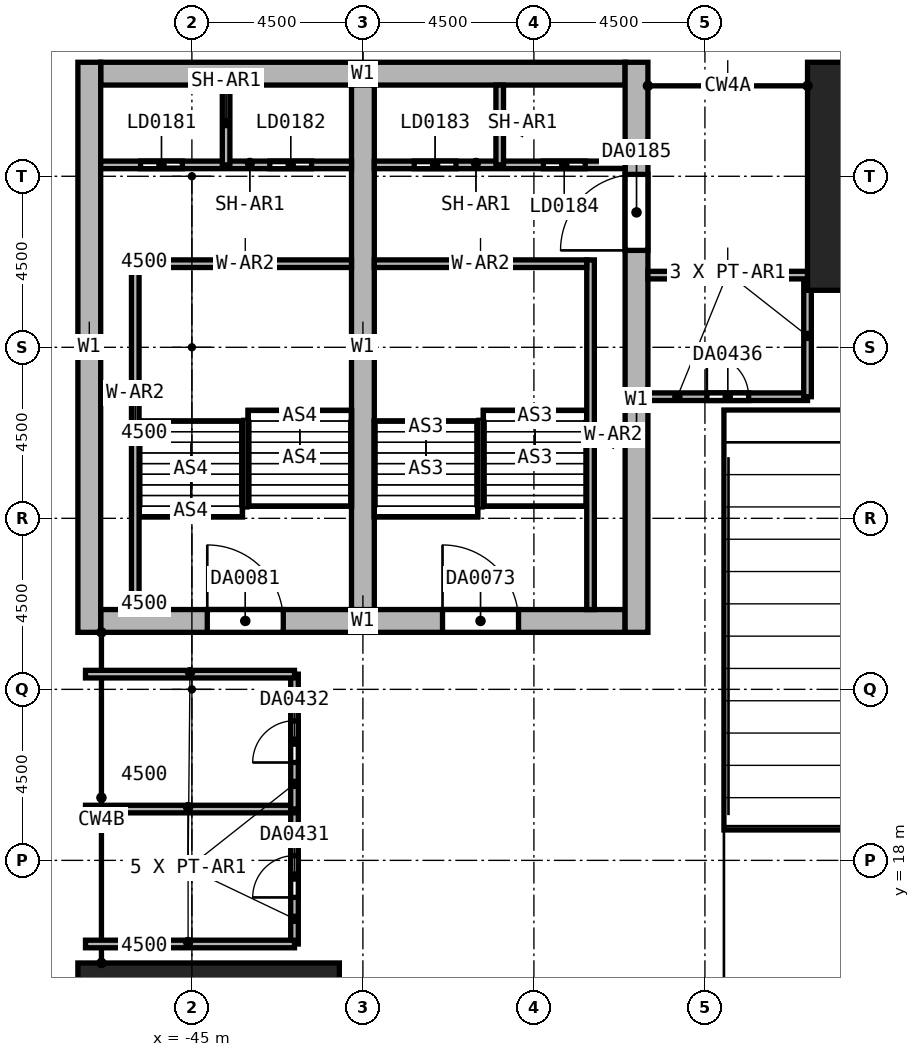
"""IFC4 building model, lengths in metres.
Left out: names, types, materials, properties, quantities, classifications, styles, units other than length and angle.
Written with IfcOpenShell. Run it as: python <this file> out.ifc"""

import sys

from ifc_helpers import new_model, si_unit, direction, frame, frame_2d, origin, origin_2d, place, context, subcontext, project, spatial, rectangle, extrude, element, fill, save


model = new_model("IFC4")
c1 = context("Model", 3, precision=1e-05, world=origin(), true_north=direction((0.0, 1.0)))
c2 = subcontext(c1, "Body", "Model", "MODEL_VIEW")
j1 = project(units=[si_unit("LENGTHUNIT", "METRE"), si_unit("PLANEANGLEUNIT", "RADIAN")], contexts=[c1])
p1 = place(None, origin())
s1 = spatial("IfcSite", under=j1, at=p1, CompositionType="ELEMENT")
p2 = place(p1, origin())
s2 = spatial("IfcBuilding", under=s1, at=p2, CompositionType="ELEMENT")
p3 = place(p2, frame((0.0, 0.0, 31.0)))
s3 = spatial("IfcBuildingStorey", under=s2, at=p3, CompositionType="ELEMENT", Elevation=31.0)
p4 = place(p3, frame((-27.0, 36.0, 0.0), z_axis=(0.0, 0.0, 1.0), x_axis=(1.0, 0.0, 0.0)))
e1 = element("IfcColumn", 1, at=p4, inside=s3, PredefinedType="COLUMN", context=c2, shape_type="SweptSolid", body=[
    extrude(rectangle(XDim=3.6, YDim=6.0, at=origin_2d()), origin(), (0.0, 0.0, 1.0), 6.0),
])
p5 = place(p3, frame((-44.56, 13.5, 0.0), z_axis=(0.0, 0.0, 1.0), x_axis=(0.0, -1.0, 0.0)))
e2 = element("IfcColumn", 2, at=p5, inside=s3, PredefinedType="COLUMN", context=c2, shape_type="SweptSolid", body=[
    extrude(rectangle(XDim=3.6, YDim=6.88, at=origin_2d()), origin(), (0.0, 0.0, 1.0), 6.0),
])
p6 = place(p3, frame((-47.4, 38.7, 0.0), z_axis=(0.0, 0.0, 1.0), x_axis=(1.0, 0.0, 0.0)))
e3 = element("IfcWall", 3, at=p6, inside=s3, PredefinedType="SHEAR", context=c2, shape_type="SweptSolid", body=[
    extrude(rectangle(XDim=13.8, YDim=0.6, at=frame_2d((6.9, 0.0))), origin(), (0.0, 0.0, 1.0), 6.0),
])
p7 = place(p3, frame((-47.4, 24.3, 0.0), z_axis=(0.0, 0.0, 1.0), x_axis=(1.0, 0.0, 0.0)))
e4 = element("IfcWall", 4, at=p7, inside=s3, PredefinedType="SHEAR", context=c2, shape_type="SweptSolid", body=[
    extrude(rectangle(XDim=13.8, YDim=0.6, at=frame_2d((6.9, 0.0))), origin(), (0.0, 0.0, 1.0), 6.0),
])
p8 = place(p7, frame((8.995, 0.0, 0.0)))
e5 = element("IfcOpeningElement", 5, at=p8, cuts=e4, PredefinedType="OPENING", context=c2, shape_type="SweptSolid", body=[
    extrude(rectangle(XDim=2.0, YDim=2.4, at=frame_2d((1.0, 1.2))), frame((0.0, 0.3, 0.0), z_axis=(0.0, -1.0, 0.0), x_axis=(1.0, 0.0, 0.0)), (0.0, 0.0, 1.0), 0.6),
])
p9 = place(p7, frame((2.805, 0.0, 0.0)))
e6 = element("IfcOpeningElement", 6, at=p9, cuts=e4, PredefinedType="OPENING", context=c2, shape_type="SweptSolid", body=[
    extrude(rectangle(XDim=2.0, YDim=2.4, at=frame_2d((1.0, 1.2))), frame((0.0, 0.3, 0.0), z_axis=(0.0, -1.0, 0.0), x_axis=(1.0, 0.0, 0.0)), (0.0, 0.0, 1.0), 0.6),
])
p10 = place(p3, frame((-47.7, 24.0, 0.0), z_axis=(0.0, 0.0, 1.0), x_axis=(0.0, 1.0, 0.0)))
e7 = element("IfcWall", 7, at=p10, inside=s3, PredefinedType="SHEAR", context=c2, shape_type="SweptSolid", body=[
    extrude(rectangle(XDim=15.0, YDim=0.6, at=frame_2d((7.5, 0.0))), origin(), (0.0, 0.0, 1.0), 6.0),
])
p11 = place(p3, frame((-33.3, 24.0, 0.0), z_axis=(0.0, 0.0, 1.0), x_axis=(0.0, 1.0, 0.0)))
e8 = element("IfcWall", 8, at=p11, inside=s3, PredefinedType="SHEAR", context=c2, shape_type="SweptSolid", body=[
    extrude(rectangle(XDim=15.0, YDim=0.6, at=frame_2d((7.5, 0.0))), origin(), (0.0, 0.0, 1.0), 6.0),
])
p12 = place(p11, frame((10.05, 0.0, 0.0)))
e9 = element("IfcOpeningElement", 9, at=p12, cuts=e8, PredefinedType="OPENING", context=c2, shape_type="SweptSolid", body=[
    extrude(rectangle(XDim=2.0, YDim=2.4, at=frame_2d((1.0, 1.2))), frame((0.0, 0.3, 0.0), z_axis=(0.0, -1.0, 0.0), x_axis=(1.0, 0.0, 0.0)), (0.0, 0.0, 1.0), 0.6),
])
p13 = place(p3, frame((-40.5, 24.6, 0.0), z_axis=(0.0, 0.0, 1.0), x_axis=(0.0, 1.0, 0.0)))
e10 = element("IfcWall", 10, at=p13, inside=s3, PredefinedType="SHEAR", context=c2, shape_type="SweptSolid", body=[
    extrude(rectangle(XDim=13.8, YDim=0.6, at=frame_2d((6.9, 0.0))), origin(), (0.0, 0.0, 1.0), 6.0),
])
p14 = place(p3, frame((-34.51, 24.6, 0.0), z_axis=(0.0, 0.0, 1.0), x_axis=(0.0, 1.0, 0.0)))
e11 = element("IfcWall", 11, at=p14, inside=s3, PredefinedType="SOLIDWALL", context=c2, shape_type="SweptSolid", body=[
    extrude(rectangle(XDim=9.2, YDim=0.2, at=frame_2d((4.6, 0.0))), origin(), (0.0, 0.0, 1.0), 6.0),
])
p15 = place(p3, frame((-40.2, 33.7, 0.0), z_axis=(0.0, 0.0, 1.0), x_axis=(1.0, 0.0, 0.0)))
e12 = element("IfcWall", 12, at=p15, inside=s3, PredefinedType="SOLIDWALL", context=c2, shape_type="SweptSolid", body=[
    extrude(rectangle(XDim=5.59, YDim=0.2, at=frame_2d((2.795, 0.0))), origin(), (0.0, 0.0, 1.0), 6.0),
])
p16 = place(p3, frame((-46.49, 24.6, 0.0), z_axis=(0.0, 0.0, 1.0), x_axis=(0.0, 1.0, 0.0)))
e13 = element("IfcWall", 13, at=p16, inside=s3, PredefinedType="SOLIDWALL", context=c2, shape_type="SweptSolid", body=[
    extrude(rectangle(XDim=9.2, YDim=0.2, at=frame_2d((4.6, 0.0))), origin(), (0.0, 0.0, 1.0), 6.0),
])
p17 = place(p3, frame((-46.39, 33.7, 0.0), z_axis=(0.0, 0.0, 1.0), x_axis=(1.0, 0.0, 0.0)))
e14 = element("IfcWall", 14, at=p17, inside=s3, PredefinedType="SOLIDWALL", context=c2, shape_type="SweptSolid", body=[
    extrude(rectangle(XDim=5.59, YDim=0.2, at=frame_2d((2.795, 0.0))), origin(), (0.0, 0.0, 1.0), 6.0),
])
p18 = place(p3, frame((-47.4, 36.3, 0.0), z_axis=(0.0, 0.0, 1.0), x_axis=(1.0, 0.0, 0.0)))
e15 = element("IfcWall", 15, at=p18, inside=s3, PredefinedType="SHEAR", context=c2, shape_type="SweptSolid", body=[
    extrude(rectangle(XDim=6.6, YDim=0.2, at=frame_2d((3.3, 0.0))), origin(), (0.0, 0.0, 1.0), 6.0),
])
p19 = place(p18, frame((1.05, 0.0, 0.0)))
e16 = element("IfcOpeningElement", 16, at=p19, cuts=e15, PredefinedType="OPENING", context=c2, shape_type="SweptSolid", body=[
    extrude(rectangle(XDim=1.1, YDim=2.4, at=frame_2d((0.55, 1.2))), frame((0.0, 0.1, 0.0), z_axis=(0.0, -1.0, 0.0), x_axis=(1.0, 0.0, 0.0)), (0.0, 0.0, 1.0), 0.2),
])
p20 = place(p18, frame((4.45, 0.0, 0.0)))
e17 = element("IfcOpeningElement", 17, at=p20, cuts=e15, PredefinedType="OPENING", context=c2, shape_type="SweptSolid", body=[
    extrude(rectangle(XDim=1.1, YDim=2.4, at=frame_2d((0.55, 1.2))), frame((0.0, 0.1, 0.0), z_axis=(0.0, -1.0, 0.0), x_axis=(1.0, 0.0, 0.0)), (0.0, 0.0, 1.0), 0.2),
])
p21 = place(p3, frame((-40.2, 36.3, 0.0), z_axis=(0.0, 0.0, 1.0), x_axis=(1.0, 0.0, 0.0)))
e18 = element("IfcWall", 18, at=p21, inside=s3, PredefinedType="SHEAR", context=c2, shape_type="SweptSolid", body=[
    extrude(rectangle(XDim=6.6, YDim=0.2, at=frame_2d((3.3, 0.0))), origin(), (0.0, 0.0, 1.0), 6.0),
])
p22 = place(p21, frame((1.05, 0.0, 0.0)))
e19 = element("IfcOpeningElement", 19, at=p22, cuts=e18, PredefinedType="OPENING", context=c2, shape_type="SweptSolid", body=[
    extrude(rectangle(XDim=1.1, YDim=2.4, at=frame_2d((0.55, 1.2))), frame((0.0, 0.1, 0.0), z_axis=(0.0, -1.0, 0.0), x_axis=(1.0, 0.0, 0.0)), (0.0, 0.0, 1.0), 0.2),
])
p23 = place(p21, frame((4.45, 0.0, 0.0)))
e20 = element("IfcOpeningElement", 20, at=p23, cuts=e18, PredefinedType="OPENING", context=c2, shape_type="SweptSolid", body=[
    extrude(rectangle(XDim=1.1, YDim=2.4, at=frame_2d((0.55, 1.2))), frame((0.0, 0.1, 0.0), z_axis=(0.0, -1.0, 0.0), x_axis=(1.0, 0.0, 0.0)), (0.0, 0.0, 1.0), 0.2),
])
for number, where, z_axis, x_axis in (
    (21, (-36.9, 36.3, 0.0), (0.0, 0.0, 1.0), (0.0, 1.0, 0.0)),
    (22, (-44.1, 36.3, 0.0), (0.0, 0.0, 1.0), (0.0, 1.0, 0.0)),
):
    element("IfcWall", number, at=place(p3, frame(where, z_axis=z_axis, x_axis=x_axis)), inside=s3, PredefinedType="SHEAR", context=c2, shape_type="SweptSolid", body=[
        extrude(rectangle(XDim=2.1, YDim=0.2, at=frame_2d((1.05, 0.0))), origin(), (0.0, 0.0, 1.0), 6.0),
    ])
p24 = place(p3, frame((-42.3, 15.8, 0.0), z_axis=(0.0, 0.0, 1.0), x_axis=(0.0, 1.0, 0.0)))
e23 = element("IfcWall", 23, at=p24, inside=s3, PredefinedType="PARTITIONING", context=c2, shape_type="SweptSolid", body=[
    extrude(rectangle(XDim=3.55, YDim=0.2, at=frame_2d((1.775, 0.0))), origin(), (0.0, 0.0, 1.0), 5.7),
])
p25 = place(p24, frame((1.225, 0.0, 0.0)))
e24 = element("IfcOpeningElement", 24, at=p25, cuts=e23, PredefinedType="OPENING", context=c2, shape_type="SweptSolid", body=[
    extrude(rectangle(XDim=1.1, YDim=2.4, at=frame_2d((0.55, 1.2))), frame((0.0, 0.1, 0.0), z_axis=(0.0, -1.0, 0.0), x_axis=(1.0, 0.0, 0.0)), (0.0, 0.0, 1.0), 0.2),
])
for number, where, z_axis, x_axis in (
    (25, (-42.3, 15.8, 0.0), (0.0, 0.0, 1.0), (-1.0, 0.0, 0.0)),
    (26, (-47.8, 19.35, 0.0), (0.0, 0.0, 1.0), (1.0, 0.0, 0.0)),
):
    element("IfcWall", number, at=place(p3, frame(where, z_axis=z_axis, x_axis=x_axis)), inside=s3, PredefinedType="PARTITIONING", context=c2, shape_type="SweptSolid", body=[
        extrude(rectangle(XDim=5.5, YDim=0.2, at=frame_2d((2.75, 0.0))), origin(), (0.0, 0.0, 1.0), 5.7),
    ])
p26 = place(p3, frame((-42.3, 19.35, 0.0), z_axis=(0.0, 0.0, 1.0), x_axis=(0.0, 1.0, 0.0)))
e27 = element("IfcWall", 27, at=p26, inside=s3, PredefinedType="PARTITIONING", context=c2, shape_type="SweptSolid", body=[
    extrude(rectangle(XDim=3.55, YDim=0.2, at=frame_2d((1.775, 0.0))), origin(), (0.0, 0.0, 1.0), 5.7),
])
p27 = place(p26, frame((1.225, 0.0, 0.0)))
e28 = element("IfcOpeningElement", 28, at=p27, cuts=e27, PredefinedType="OPENING", context=c2, shape_type="SweptSolid", body=[
    extrude(rectangle(XDim=1.1, YDim=2.4, at=frame_2d((0.55, 1.2))), frame((0.0, 0.1, 0.0), z_axis=(0.0, -1.0, 0.0), x_axis=(1.0, 0.0, 0.0)), (0.0, 0.0, 1.0), 0.2),
])
p28 = place(p3, frame((-42.3, 22.9, 0.0), z_axis=(0.0, 0.0, 1.0), x_axis=(-1.0, 0.0, 0.0)))
e29 = element("IfcWall", 29, at=p28, inside=s3, PredefinedType="PARTITIONING", context=c2, shape_type="SweptSolid", body=[
    extrude(rectangle(XDim=5.5, YDim=0.2, at=frame_2d((2.75, 0.0))), origin(), (0.0, 0.0, 1.0), 5.7),
])
p29 = place(p3, frame((-33.0, 30.2, 0.0), z_axis=(0.0, 0.0, 1.0), x_axis=(1.0, 0.0, 0.0)))
e30 = element("IfcWall", 30, at=p29, inside=s3, PredefinedType="PARTITIONING", context=c2, shape_type="SweptSolid", body=[
    extrude(rectangle(XDim=4.2, YDim=0.2, at=frame_2d((2.1, 0.0))), origin(), (0.0, 0.0, 1.0), 5.7),
])
p30 = place(p29, frame((1.55, 0.0, 0.0)))
e31 = element("IfcOpeningElement", 31, at=p30, cuts=e30, PredefinedType="OPENING", context=c2, shape_type="SweptSolid", body=[
    extrude(rectangle(XDim=1.1, YDim=2.4, at=frame_2d((0.55, 1.2))), frame((0.0, 0.1, 0.0), z_axis=(0.0, -1.0, 0.0), x_axis=(1.0, 0.0, 0.0)), (0.0, 0.0, 1.0), 0.2),
])
p31 = place(p3, frame((-28.8, 30.2, 0.0), z_axis=(0.0, 0.0, 1.0), x_axis=(0.0, 1.0, 0.0)))
e32 = element("IfcWall", 32, at=p31, inside=s3, PredefinedType="PARTITIONING", context=c2, shape_type="SweptSolid", body=[
    extrude(rectangle(XDim=3.2, YDim=0.2, at=frame_2d((1.6, 0.0))), origin(), (0.0, 0.0, 1.0), 5.7),
])
p32 = place(p3, frame((-33.0, 33.4, 0.0), z_axis=(0.0, 0.0, 1.0), x_axis=(1.0, 0.0, 0.0)))
e33 = element("IfcWall", 33, at=p32, inside=s3, PredefinedType="PARTITIONING", context=c2, shape_type="SweptSolid", body=[
    extrude(rectangle(XDim=4.2, YDim=0.2, at=frame_2d((2.1, 0.0))), origin(), (0.0, 0.0, 1.0), 5.7),
])
p33 = place(p8, origin())
e34 = element("IfcDoor", 34, at=p33, inside=s3, OperationType="DOUBLE_DOOR_SINGLE_SWING", PredefinedType="DOOR", context=c2, shape_type="SweptSolid", body=[
    extrude(rectangle(XDim=2.0, YDim=2.4, at=frame_2d((1.0, 1.2))), frame((0.0, 0.025, 0.0), z_axis=(0.0, -1.0, 0.0), x_axis=(1.0, 0.0, 0.0)), (0.0, 0.0, 1.0), 0.05),
])
fill(e5, e34)
p34 = place(p9, origin())
e35 = element("IfcDoor", 35, at=p34, inside=s3, OperationType="DOUBLE_DOOR_SINGLE_SWING", PredefinedType="DOOR", context=c2, shape_type="SweptSolid", body=[
    extrude(rectangle(XDim=2.0, YDim=2.4, at=frame_2d((1.0, 1.2))), frame((0.0, 0.025, 0.0), z_axis=(0.0, -1.0, 0.0), x_axis=(1.0, 0.0, 0.0)), (0.0, 0.0, 1.0), 0.05),
])
fill(e6, e35)
p35 = place(p19, origin())
e36 = element("IfcDoor", 36, at=p35, inside=s3, OperationType="DOUBLE_DOOR_SLIDING", PredefinedType="DOOR", context=c2, shape_type="SweptSolid", body=[
    extrude(rectangle(XDim=1.1, YDim=2.4, at=frame_2d((0.55, 1.2))), frame((0.0, 0.025, 0.0), z_axis=(0.0, -1.0, 0.0), x_axis=(1.0, 0.0, 0.0)), (0.0, 0.0, 1.0), 0.05),
])
fill(e16, e36)
p36 = place(p20, origin())
e37 = element("IfcDoor", 37, at=p36, inside=s3, OperationType="DOUBLE_DOOR_SLIDING", PredefinedType="DOOR", context=c2, shape_type="SweptSolid", body=[
    extrude(rectangle(XDim=1.1, YDim=2.4, at=frame_2d((0.55, 1.2))), frame((0.0, 0.025, 0.0), z_axis=(0.0, -1.0, 0.0), x_axis=(1.0, 0.0, 0.0)), (0.0, 0.0, 1.0), 0.05),
])
fill(e17, e37)
p37 = place(p22, origin())
e38 = element("IfcDoor", 38, at=p37, inside=s3, OperationType="DOUBLE_DOOR_SLIDING", PredefinedType="DOOR", context=c2, shape_type="SweptSolid", body=[
    extrude(rectangle(XDim=1.1, YDim=2.4, at=frame_2d((0.55, 1.2))), frame((0.0, 0.025, 0.0), z_axis=(0.0, -1.0, 0.0), x_axis=(1.0, 0.0, 0.0)), (0.0, 0.0, 1.0), 0.05),
])
fill(e19, e38)
p38 = place(p23, origin())
e39 = element("IfcDoor", 39, at=p38, inside=s3, OperationType="DOUBLE_DOOR_SLIDING", PredefinedType="DOOR", context=c2, shape_type="SweptSolid", body=[
    extrude(rectangle(XDim=1.1, YDim=2.4, at=frame_2d((0.55, 1.2))), frame((0.0, 0.025, 0.0), z_axis=(0.0, -1.0, 0.0), x_axis=(1.0, 0.0, 0.0)), (0.0, 0.0, 1.0), 0.05),
])
fill(e20, e39)
p39 = place(p12, origin())
e40 = element("IfcDoor", 40, at=p39, inside=s3, OperationType="DOUBLE_DOOR_SINGLE_SWING", PredefinedType="DOOR", context=c2, shape_type="SweptSolid", body=[
    extrude(rectangle(XDim=2.0, YDim=2.4, at=frame_2d((1.0, 1.2))), frame((0.0, 0.025, 0.0), z_axis=(0.0, -1.0, 0.0), x_axis=(1.0, 0.0, 0.0)), (0.0, 0.0, 1.0), 0.05),
])
fill(e9, e40)
p40 = place(p25, origin())
e41 = element("IfcDoor", 41, at=p40, inside=s3, OperationType="DOUBLE_DOOR_SINGLE_SWING", PredefinedType="DOOR", context=c2, shape_type="SweptSolid", body=[
    extrude(rectangle(XDim=1.1, YDim=2.4, at=frame_2d((0.55, 1.2))), frame((0.0, 0.025, 0.0), z_axis=(0.0, -1.0, 0.0), x_axis=(1.0, 0.0, 0.0)), (0.0, 0.0, 1.0), 0.05),
])
fill(e24, e41)
p41 = place(p27, origin())
e42 = element("IfcDoor", 42, at=p41, inside=s3, OperationType="DOUBLE_DOOR_SINGLE_SWING", PredefinedType="DOOR", context=c2, shape_type="SweptSolid", body=[
    extrude(rectangle(XDim=1.1, YDim=2.4, at=frame_2d((0.55, 1.2))), frame((0.0, 0.025, 0.0), z_axis=(0.0, -1.0, 0.0), x_axis=(1.0, 0.0, 0.0)), (0.0, 0.0, 1.0), 0.05),
])
fill(e28, e42)
p42 = place(p30, origin())
e43 = element("IfcDoor", 43, at=p42, inside=s3, OperationType="DOUBLE_DOOR_SINGLE_SWING", PredefinedType="DOOR", context=c2, shape_type="SweptSolid", body=[
    extrude(rectangle(XDim=1.1, YDim=2.4, at=frame_2d((0.55, 1.2))), frame((0.0, 0.025, 0.0), z_axis=(0.0, -1.0, 0.0), x_axis=(1.0, 0.0, 0.0)), (0.0, 0.0, 1.0), 0.05),
])
fill(e31, e43)
save(model, sys.argv[1])
